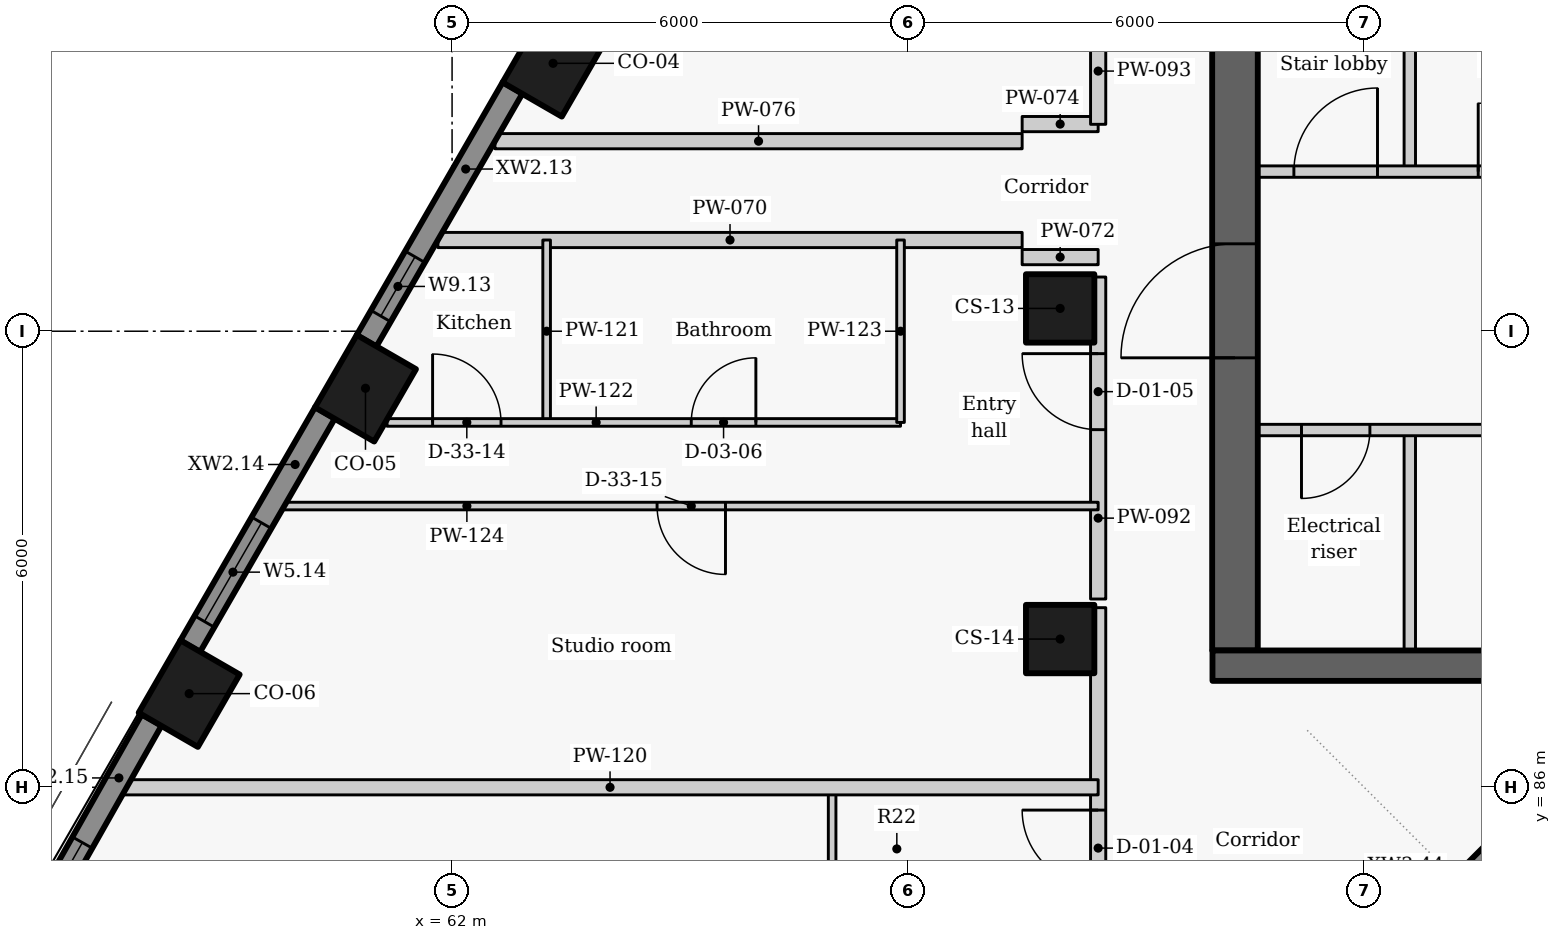
"""IFC4 building model, lengths in metres.
Left out: names, types, materials, properties, quantities, classifications, styles, units other than length and angle.
Written with IfcOpenShell. Run it as: python <this file> out.ifc"""

import sys

from ifc_helpers import new_model, si_unit, direction, frame, frame_2d, origin, origin_2d, place, context, subcontext, project, spatial, rectangle, extrude, element, fill, save


model = new_model("IFC4")
c1 = context("Model", 3, precision=1e-05, world=origin(), true_north=direction((0.0, 1.0)))
c2 = subcontext(c1, "Body", "Model", "MODEL_VIEW")
j1 = project(units=[si_unit("LENGTHUNIT", "METRE"), si_unit("PLANEANGLEUNIT", "RADIAN")], contexts=[c1])
p1 = place(None, origin())
s1 = spatial("IfcSite", under=j1, at=p1, CompositionType="ELEMENT")
p2 = place(p1, origin())
s2 = spatial("IfcBuilding", under=s1, at=p2, CompositionType="ELEMENT")
p3 = place(p2, frame((0.0, 0.0, 249.3)))
s3 = spatial("IfcBuildingStorey", under=s2, at=p3, CompositionType="ELEMENT", Elevation=249.3)
for number, where, z_axis, x_axis in (
    (1, (63.329, 95.525, 0.0), (0.0, 0.0, 1.0), (-0.5, -0.866, 0.0)),
    (2, (60.861, 91.25, 0.0), (0.0, 0.0, 1.0), (-0.5, -0.866, 0.0)),
    (3, (58.541, 87.232, 0.0), (0.0, 0.0, 1.0), (-0.5, -0.866, 0.0)),
):
    element("IfcColumn", number, at=place(p3, frame(where, z_axis=z_axis, x_axis=x_axis)), inside=s3, PredefinedType="COLUMN", context=c2, shape_type="SweptSolid", body=[
        extrude(rectangle(XDim=1.1, YDim=0.9, at=origin_2d()), origin(), (0.0, 0.0, 1.0), 3.3),
    ])
for number, where, z_axis, x_axis in (
    (4, (70.0, 92.3, 0.0), (0.0, 0.0, 1.0), (0.0, -1.0, 0.0)),
    (5, (70.0, 87.95, 0.0), (0.0, 0.0, 1.0), (0.0, -1.0, 0.0)),
):
    element("IfcColumn", number, at=place(p3, frame(where, z_axis=z_axis, x_axis=x_axis)), inside=s3, PredefinedType="COLUMN", context=c2, shape_type="SweptSolid", body=[
        extrude(rectangle(XDim=0.9, YDim=0.9, at=origin_2d()), origin(), (0.0, 0.0, 1.0), 3.3),
    ])
p4 = place(p3, frame((62.796, 95.202, 0.0), z_axis=(0.0, 0.0, 1.0), x_axis=(-0.499984490703, -0.866034357896, 0.0)))
e6 = element("IfcWall", 6, at=p4, inside=s3, PredefinedType="SOLIDWALL", context=c2, shape_type="SweptSolid", body=[
    extrude(rectangle(XDim=3.844, YDim=0.3, at=frame_2d((1.922, 0.0))), origin(), (0.0, 0.0, 1.0), 2.425),
])
p5 = place(p4, frame((2.567, 0.0, 0.9)))
e7 = element("IfcOpeningElement", 7, at=p5, cuts=e6, PredefinedType="OPENING", context=c2, shape_type="SweptSolid", body=[
    extrude(rectangle(XDim=0.9, YDim=1.1, at=frame_2d((0.45, 0.55))), frame((0.0, 0.16, 0.0), z_axis=(0.0, -1.0, 0.0), x_axis=(1.0, 0.0, 0.0)), (0.0, 0.0, 1.0), 0.32),
])
p6 = place(p3, frame((60.328, 90.927, 0.0), z_axis=(0.0, 0.0, 1.0), x_axis=(-0.500010404316, -0.866019396766, 0.0)))
e8 = element("IfcWall", 8, at=p6, inside=s3, PredefinedType="SOLIDWALL", context=c2, shape_type="SweptSolid", body=[
    extrude(rectangle(XDim=3.547, YDim=0.3, at=frame_2d((1.774, 0.0))), origin(), (0.0, 0.0, 1.0), 2.425),
])
p7 = place(p6, frame((1.671, 0.0, 0.9)))
e9 = element("IfcOpeningElement", 9, at=p7, cuts=e8, PredefinedType="OPENING", context=c2, shape_type="SweptSolid", body=[
    extrude(rectangle(XDim=1.5, YDim=1.1, at=frame_2d((0.75, 0.55))), frame((0.0, 0.16, 0.0), z_axis=(0.0, -1.0, 0.0), x_axis=(1.0, 0.0, 0.0)), (0.0, 0.0, 1.0), 0.32),
])
p8 = place(p3, frame((58.048, 86.886, 0.0), z_axis=(0.0, 0.0, 1.0), x_axis=(-0.492080931903, -0.870549456641, 0.0)))
e10 = element("IfcWall", 10, at=p8, inside=s3, PredefinedType="SOLIDWALL", context=c2, shape_type="SweptSolid", body=[
    extrude(rectangle(XDim=5.437, YDim=0.3, at=frame_2d((2.718, 0.0))), origin(), (0.0, 0.0, 1.0), 2.425),
])
p9 = place(p8, frame((1.854, 0.0, 0.9)))
e11 = element("IfcOpeningElement", 11, at=p9, cuts=e10, PredefinedType="OPENING", context=c2, shape_type="SweptSolid", body=[
    extrude(rectangle(XDim=2.1, YDim=1.1, at=frame_2d((1.05, 0.55))), frame((0.0, 0.16, 0.0), z_axis=(0.0, -1.0, 0.0), x_axis=(1.0, 0.0, 0.0)), (0.0, 0.0, 1.0), 0.32),
])
p10 = place(p3, frame((74.194, 83.661, 0.0), z_axis=(0.0, 0.0, 1.0), x_axis=(0.707106781187, 0.707106781187, 0.0)))
e12 = element("IfcWall", 12, at=p10, inside=s3, PredefinedType="SOLIDWALL", context=c2, shape_type="SweptSolid", body=[
    extrude(rectangle(XDim=3.033, YDim=0.25, at=frame_2d((1.517, 0.0))), origin(), (0.0, 0.0, 1.0), 2.425),
])
p11 = place(p3, frame((74.6, 87.8, 0.0), z_axis=(0.0, 0.0, 1.0), x_axis=(0.0, 1.0, 0.0)))
e13 = element("IfcWall", 13, at=p11, inside=s3, PredefinedType="PARTITIONING", context=c2, shape_type="SweptSolid", body=[
    extrude(rectangle(XDim=2.9, YDim=0.15, at=frame_2d((1.45, 0.0))), origin(), (0.0, 0.0, 1.0), 3.025),
])
p12 = place(p3, frame((74.6, 94.1, 0.0), z_axis=(0.0, 0.0, 1.0), x_axis=(0.0, 1.0, 0.0)))
e14 = element("IfcWall", 14, at=p12, inside=s3, PredefinedType="PARTITIONING", context=c2, shape_type="SweptSolid", body=[
    extrude(rectangle(XDim=2.8, YDim=0.15, at=frame_2d((1.4, 0.0))), origin(), (0.0, 0.0, 1.0), 3.025),
])
p13 = place(p3, frame((85.4, 90.7, 0.0), z_axis=(0.0, 0.0, 1.0), x_axis=(-1.0, 0.0, 0.0)))
e15 = element("IfcWall", 15, at=p13, inside=s3, PredefinedType="PARTITIONING", context=c2, shape_type="SweptSolid", body=[
    extrude(rectangle(XDim=13.4, YDim=0.15, at=frame_2d((6.7, 0.0))), origin(), (0.0, 0.0, 1.0), 3.025),
])
p14 = place(p13, frame((11.325, 0.0, 0.0)))
e16 = element("IfcOpeningElement", 16, at=p14, cuts=e15, PredefinedType="OPENING", context=c2, shape_type="SweptSolid", body=[
    extrude(rectangle(XDim=0.9, YDim=2.1, at=frame_2d((0.45, 1.05))), frame((0.0, 0.085, 0.0), z_axis=(0.0, -1.0, 0.0), x_axis=(1.0, 0.0, 0.0)), (0.0, 0.0, 1.0), 0.17),
])
p15 = place(p13, frame((7.65, 0.0, 0.0)))
e17 = element("IfcOpeningElement", 17, at=p15, cuts=e15, PredefinedType="OPENING", context=c2, shape_type="SweptSolid", body=[
    extrude(rectangle(XDim=0.9, YDim=2.1, at=frame_2d((0.45, 1.05))), frame((0.0, 0.085, 0.0), z_axis=(0.0, -1.0, 0.0), x_axis=(1.0, 0.0, 0.0)), (0.0, 0.0, 1.0), 0.17),
])
p16 = place(p13, frame((3.6, 0.0, 0.0)))
e18 = element("IfcOpeningElement", 18, at=p16, cuts=e15, PredefinedType="OPENING", context=c2, shape_type="SweptSolid", body=[
    extrude(rectangle(XDim=0.9, YDim=2.1, at=frame_2d((0.45, 1.05))), frame((0.0, 0.085, 0.0), z_axis=(0.0, -1.0, 0.0), x_axis=(1.0, 0.0, 0.0)), (0.0, 0.0, 1.0), 0.17),
])
p17 = place(p13, frame((0.9, 0.0, 0.0)))
e19 = element("IfcOpeningElement", 19, at=p17, cuts=e15, PredefinedType="OPENING", context=c2, shape_type="SweptSolid", body=[
    extrude(rectangle(XDim=0.9, YDim=2.1, at=frame_2d((0.45, 1.05))), frame((0.0, 0.085, 0.0), z_axis=(0.0, -1.0, 0.0), x_axis=(1.0, 0.0, 0.0)), (0.0, 0.0, 1.0), 0.17),
])
p18 = place(p3, frame((72.3, 87.8, -0.275), z_axis=(0.0, 0.0, 1.0), x_axis=(0.0, 1.0, 0.0)))
e20 = element("IfcWall", 20, at=p18, inside=s3, PredefinedType="SHEAR", context=c2, shape_type="SweptSolid", body=[
    extrude(rectangle(XDim=9.1, YDim=0.6, at=frame_2d((4.55, 0.0))), origin(), (0.0, 0.0, 1.0), 3.3),
])
p19 = place(p18, frame((3.85, 0.0, 0.275)))
e21 = element("IfcOpeningElement", 21, at=p19, cuts=e20, PredefinedType="OPENING", context=c2, shape_type="SweptSolid", body=[
    extrude(rectangle(XDim=1.5, YDim=2.1, at=frame_2d((0.75, 1.05))), frame((0.0, 0.31, 0.0), z_axis=(0.0, -1.0, 0.0), x_axis=(1.0, 0.0, 0.0)), (0.0, 0.0, 1.0), 0.62),
])
p20 = place(p3, frame((72.0, 94.1, 0.0), z_axis=(0.0, 0.0, 1.0), x_axis=(1.0, 0.0, 0.0)))
e22 = element("IfcWall", 22, at=p20, inside=s3, PredefinedType="PARTITIONING", context=c2, shape_type="SweptSolid", body=[
    extrude(rectangle(XDim=10.703, YDim=0.15, at=frame_2d((5.352, 0.0))), origin(), (0.0, 0.0, 1.0), 3.025),
])
p21 = place(p20, frame((1.075, 0.0, 0.0)))
e23 = element("IfcOpeningElement", 23, at=p21, cuts=e22, PredefinedType="OPENING", context=c2, shape_type="SweptSolid", body=[
    extrude(rectangle(XDim=1.1, YDim=2.1, at=frame_2d((0.55, 1.05))), frame((0.0, 0.085, 0.0), z_axis=(0.0, -1.0, 0.0), x_axis=(1.0, 0.0, 0.0)), (0.0, 0.0, 1.0), 0.17),
])
p22 = place(p20, frame((3.5, 0.0, 0.0)))
e24 = element("IfcOpeningElement", 24, at=p22, cuts=e22, PredefinedType="OPENING", context=c2, shape_type="SweptSolid", body=[
    extrude(rectangle(XDim=0.9, YDim=2.1, at=frame_2d((0.45, 1.05))), frame((0.0, 0.085, 0.0), z_axis=(0.0, -1.0, 0.0), x_axis=(1.0, 0.0, 0.0)), (0.0, 0.0, 1.0), 0.17),
])
p23 = place(p20, frame((6.05, 0.0, 0.0)))
e25 = element("IfcOpeningElement", 25, at=p23, cuts=e22, PredefinedType="OPENING", context=c2, shape_type="SweptSolid", body=[
    extrude(rectangle(XDim=1.2, YDim=2.1, at=frame_2d((0.6, 1.05))), frame((0.0, 0.085, 0.0), z_axis=(0.0, -1.0, 0.0), x_axis=(1.0, 0.0, 0.0)), (0.0, 0.0, 1.0), 0.17),
])
p24 = place(p20, frame((8.9, 0.0, 0.0)))
e26 = element("IfcOpeningElement", 26, at=p24, cuts=e22, PredefinedType="OPENING", context=c2, shape_type="SweptSolid", body=[
    extrude(rectangle(XDim=0.9, YDim=2.1, at=frame_2d((0.45, 1.05))), frame((0.0, 0.085, 0.0), z_axis=(0.0, -1.0, 0.0), x_axis=(1.0, 0.0, 0.0)), (0.0, 0.0, 1.0), 0.17),
])
p25 = place(p3, frame((61.813, 93.2, 0.0), z_axis=(0.0, 0.0, 1.0), x_axis=(1.0, 0.0, 0.0)))
e27 = element("IfcWall", 27, at=p25, inside=s3, PredefinedType="PARTITIONING", context=c2, shape_type="SweptSolid", body=[
    extrude(rectangle(XDim=7.687, YDim=0.2, at=frame_2d((3.843, 0.0))), origin(), (0.0, 0.0, 1.0), 2.405),
])
for number, where, z_axis, x_axis in (
    (28, (69.5, 92.975, 0.0), (0.0, 0.0, 1.0), (1.0, 0.0, 0.0)),
    (29, (69.5, 94.725, 0.0), (0.0, 0.0, 1.0), (1.0, 0.0, 0.0)),
):
    element("IfcWall", number, at=place(p3, frame(where, z_axis=z_axis, x_axis=x_axis)), inside=s3, PredefinedType="PARTITIONING", context=c2, shape_type="SweptSolid", body=[
        extrude(rectangle(XDim=1.0, YDim=0.2, at=frame_2d((0.5, 0.0))), origin(), (0.0, 0.0, 1.0), 2.505),
    ])
p26 = place(p3, frame((62.564, 94.5, 0.0), z_axis=(0.0, 0.0, 1.0), x_axis=(1.0, 0.0, 0.0)))
e30 = element("IfcWall", 30, at=p26, inside=s3, PredefinedType="PARTITIONING", context=c2, shape_type="SweptSolid", body=[
    extrude(rectangle(XDim=6.936, YDim=0.2, at=frame_2d((3.468, 0.0))), origin(), (0.0, 0.0, 1.0), 2.405),
])
p27 = place(p3, frame((70.5, 72.577, 0.0), z_axis=(0.0, 0.0, 1.0), x_axis=(0.0, 1.0, 0.0)))
e31 = element("IfcWall", 31, at=p27, inside=s3, PredefinedType="PARTITIONING", context=c2, shape_type="SweptSolid", body=[
    extrude(rectangle(XDim=15.786, YDim=0.2, at=frame_2d((7.893, 0.0))), origin(), (0.0, 0.0, 1.0), 3.025),
])
p28 = place(p27, frame((1.723, 0.0, 0.0)))
e32 = element("IfcOpeningElement", 32, at=p28, cuts=e31, PredefinedType="OPENING", context=c2, shape_type="SweptSolid", body=[
    extrude(rectangle(XDim=1.0, YDim=2.1, at=frame_2d((0.5, 1.05))), frame((0.0, 0.11, 0.0), z_axis=(0.0, -1.0, 0.0), x_axis=(1.0, 0.0, 0.0)), (0.0, 0.0, 1.0), 0.22),
])
p29 = place(p27, frame((12.123, 0.0, 0.0)))
e33 = element("IfcOpeningElement", 33, at=p29, cuts=e31, PredefinedType="OPENING", context=c2, shape_type="SweptSolid", body=[
    extrude(rectangle(XDim=1.0, YDim=2.1, at=frame_2d((0.5, 1.05))), frame((0.0, 0.11, 0.0), z_axis=(0.0, -1.0, 0.0), x_axis=(1.0, 0.0, 0.0)), (0.0, 0.0, 1.0), 0.22),
])
p30 = place(p3, frame((70.5, 88.477, 0.0), z_axis=(0.0, 0.0, 1.0), x_axis=(0.0, 1.0, 0.0)))
e34 = element("IfcWall", 34, at=p30, inside=s3, PredefinedType="PARTITIONING", context=c2, shape_type="SweptSolid", body=[
    extrude(rectangle(XDim=4.236, YDim=0.2, at=frame_2d((2.118, 0.0))), origin(), (0.0, 0.0, 1.0), 3.025),
])
p31 = place(p30, frame((2.228, 0.0, 0.0)))
e35 = element("IfcOpeningElement", 35, at=p31, cuts=e34, PredefinedType="OPENING", context=c2, shape_type="SweptSolid", body=[
    extrude(rectangle(XDim=1.0, YDim=2.1, at=frame_2d((0.5, 1.05))), frame((0.0, 0.11, 0.0), z_axis=(0.0, -1.0, 0.0), x_axis=(1.0, 0.0, 0.0)), (0.0, 0.0, 1.0), 0.22),
])
p32 = place(p3, frame((70.5, 94.722, 0.0), z_axis=(0.0, 0.0, 1.0), x_axis=(0.0, 1.0, 0.0)))
e36 = element("IfcWall", 36, at=p32, inside=s3, PredefinedType="PARTITIONING", context=c2, shape_type="SweptSolid", body=[
    extrude(rectangle(XDim=1.401, YDim=0.2, at=frame_2d((0.701, 0.0))), origin(), (0.0, 0.0, 1.0), 3.025),
])
p33 = place(p3, frame((67.0, 74.0, 0.0), z_axis=(0.0, 0.0, 1.0), x_axis=(0.0, 1.0, 0.0)))
e37 = element("IfcWall", 37, at=p33, inside=s3, PredefinedType="PARTITIONING", context=c2, shape_type="SweptSolid", body=[
    extrude(rectangle(XDim=12.0, YDim=0.1, at=frame_2d((6.0, 0.0))), origin(), (0.0, 0.0, 1.0), 3.025),
])
p34 = place(p33, frame((2.55, 0.0, 0.0)))
e38 = element("IfcOpeningElement", 38, at=p34, cuts=e37, PredefinedType="OPENING", context=c2, shape_type="SweptSolid", body=[
    extrude(rectangle(XDim=0.9, YDim=2.1, at=frame_2d((0.45, 1.05))), frame((0.0, 0.06, 0.0), z_axis=(0.0, -1.0, 0.0), x_axis=(1.0, 0.0, 0.0)), (0.0, 0.0, 1.0), 0.12),
])
p35 = place(p33, frame((8.55, 0.0, 0.0)))
e39 = element("IfcOpeningElement", 39, at=p35, cuts=e37, PredefinedType="OPENING", context=c2, shape_type="SweptSolid", body=[
    extrude(rectangle(XDim=0.9, YDim=2.1, at=frame_2d((0.45, 1.05))), frame((0.0, 0.06, 0.0), z_axis=(0.0, -1.0, 0.0), x_axis=(1.0, 0.0, 0.0)), (0.0, 0.0, 1.0), 0.12),
])
p36 = place(p3, frame((57.656, 86.0, 0.0), z_axis=(0.0, 0.0, 1.0), x_axis=(1.0, 0.0, 0.0)))
e40 = element("IfcWall", 40, at=p36, inside=s3, PredefinedType="PARTITIONING", context=c2, shape_type="SweptSolid", body=[
    extrude(rectangle(XDim=12.844, YDim=0.2, at=frame_2d((6.422, 0.0))), origin(), (0.0, 0.0, 1.0), 2.405),
])
p37 = place(p3, frame((63.244, 90.8, 0.0), z_axis=(0.0, 0.0, 1.0), x_axis=(0.0, 1.0, 0.0)))
e41 = element("IfcWall", 41, at=p37, inside=s3, PredefinedType="PARTITIONING", context=c2, shape_type="SweptSolid", body=[
    extrude(rectangle(XDim=2.4, YDim=0.1, at=frame_2d((1.2, 0.0))), origin(), (0.0, 0.0, 1.0), 3.025),
])
p38 = place(p3, frame((61.144, 90.8, 0.0), z_axis=(0.0, 0.0, 1.0), x_axis=(1.0, 0.0, 0.0)))
e42 = element("IfcWall", 42, at=p38, inside=s3, PredefinedType="PARTITIONING", context=c2, shape_type="SweptSolid", body=[
    extrude(rectangle(XDim=6.756, YDim=0.1, at=frame_2d((3.378, 0.0))), origin(), (0.0, 0.0, 1.0), 3.025),
])
p39 = place(p38, frame((0.6, 0.0, 0.0)))
e43 = element("IfcOpeningElement", 43, at=p39, cuts=e42, PredefinedType="OPENING", context=c2, shape_type="SweptSolid", body=[
    extrude(rectangle(XDim=0.9, YDim=2.1, at=frame_2d((0.45, 1.05))), frame((0.0, 0.06, 0.0), z_axis=(0.0, -1.0, 0.0), x_axis=(1.0, 0.0, 0.0)), (0.0, 0.0, 1.0), 0.12),
])
p40 = place(p38, frame((4.003, 0.0, 0.0)))
e44 = element("IfcOpeningElement", 44, at=p40, cuts=e42, PredefinedType="OPENING", context=c2, shape_type="SweptSolid", body=[
    extrude(rectangle(XDim=0.85, YDim=2.1, at=frame_2d((0.425, 1.05))), frame((0.0, 0.06, 0.0), z_axis=(0.0, -1.0, 0.0), x_axis=(1.0, 0.0, 0.0)), (0.0, 0.0, 1.0), 0.12),
])
p41 = place(p3, frame((67.9, 90.8, 0.0), z_axis=(0.0, 0.0, 1.0), x_axis=(0.0, 1.0, 0.0)))
e45 = element("IfcWall", 45, at=p41, inside=s3, PredefinedType="PARTITIONING", context=c2, shape_type="SweptSolid", body=[
    extrude(rectangle(XDim=2.4, YDim=0.1, at=frame_2d((1.2, 0.0))), origin(), (0.0, 0.0, 1.0), 3.025),
])
p42 = place(p3, frame((70.5, 89.7, 0.0), z_axis=(0.0, 0.0, 1.0), x_axis=(-1.0, 0.0, 0.0)))
e46 = element("IfcWall", 46, at=p42, inside=s3, PredefinedType="PARTITIONING", context=c2, shape_type="SweptSolid", body=[
    extrude(rectangle(XDim=10.707, YDim=0.1, at=frame_2d((5.354, 0.0))), origin(), (0.0, 0.0, 1.0), 2.405),
])
p43 = place(p42, frame((4.903, 0.0, 0.0)))
e47 = element("IfcOpeningElement", 47, at=p43, cuts=e46, PredefinedType="OPENING", context=c2, shape_type="SweptSolid", body=[
    extrude(rectangle(XDim=0.9, YDim=2.1, at=frame_2d((0.45, 1.05))), frame((0.0, 0.06, 0.0), z_axis=(0.0, -1.0, 0.0), x_axis=(1.0, 0.0, 0.0)), (0.0, 0.0, 1.0), 0.12),
])
p44 = place(p3, frame((72.004, 87.6, -0.275), z_axis=(0.0, 0.0, 1.0), x_axis=(1.0, 0.0, 0.0)))
e48 = element("IfcWall", 48, at=p44, inside=s3, PredefinedType="SHEAR", context=c2, shape_type="SweptSolid", body=[
    extrude(rectangle(XDim=15.992, YDim=0.4, at=frame_2d((7.996, 0.0))), origin(), (0.0, 0.0, 1.0), 3.3),
])
p45 = place(p5, origin())
e49 = element("IfcWindow", 49, at=p45, inside=s3, PartitioningType="SINGLE_PANEL", PredefinedType="WINDOW", context=c2, shape_type="SweptSolid", body=[
    extrude(rectangle(XDim=0.9, YDim=1.1, at=frame_2d((0.45, 0.55))), frame((0.0, 0.03, 0.0), z_axis=(0.0, -1.0, 0.0), x_axis=(1.0, 0.0, 0.0)), (0.0, 0.0, 1.0), 0.06),
])
fill(e7, e49)
p46 = place(p7, origin())
e50 = element("IfcWindow", 50, at=p46, inside=s3, PartitioningType="SINGLE_PANEL", PredefinedType="WINDOW", context=c2, shape_type="SweptSolid", body=[
    extrude(rectangle(XDim=1.5, YDim=1.1, at=frame_2d((0.75, 0.55))), frame((0.0, 0.03, 0.0), z_axis=(0.0, -1.0, 0.0), x_axis=(1.0, 0.0, 0.0)), (0.0, 0.0, 1.0), 0.06),
])
fill(e9, e50)
p47 = place(p9, origin())
e51 = element("IfcWindow", 51, at=p47, inside=s3, PartitioningType="SINGLE_PANEL", PredefinedType="WINDOW", context=c2, shape_type="SweptSolid", body=[
    extrude(rectangle(XDim=2.1, YDim=1.1, at=frame_2d((1.05, 0.55))), frame((0.0, 0.03, 0.0), z_axis=(0.0, -1.0, 0.0), x_axis=(1.0, 0.0, 0.0)), (0.0, 0.0, 1.0), 0.06),
])
fill(e11, e51)
p48 = place(p14, origin())
e52 = element("IfcDoor", 52, at=p48, inside=s3, OperationType="SINGLE_SWING_RIGHT", PredefinedType="DOOR", context=c2, shape_type="SweptSolid", body=[
    extrude(rectangle(XDim=0.9, YDim=2.1, at=frame_2d((0.45, 1.05))), frame((0.0, 0.025, 0.0), z_axis=(0.0, -1.0, 0.0), x_axis=(1.0, 0.0, 0.0)), (0.0, 0.0, 1.0), 0.05),
])
fill(e16, e52)
p49 = place(p21, origin())
e53 = element("IfcDoor", 53, at=p49, inside=s3, OperationType="SINGLE_SWING_RIGHT", PredefinedType="DOOR", context=c2, shape_type="SweptSolid", body=[
    extrude(rectangle(XDim=1.1, YDim=2.1, at=frame_2d((0.55, 1.05))), frame((0.0, 0.025, 0.0), z_axis=(0.0, -1.0, 0.0), x_axis=(1.0, 0.0, 0.0)), (0.0, 0.0, 1.0), 0.05),
])
fill(e23, e53)
p50 = place(p22, origin())
e54 = element("IfcDoor", 54, at=p50, inside=s3, OperationType="SINGLE_SWING_LEFT", PredefinedType="DOOR", context=c2, shape_type="SweptSolid", body=[
    extrude(rectangle(XDim=0.9, YDim=2.1, at=frame_2d((0.45, 1.05))), frame((0.0, 0.025, 0.0), z_axis=(0.0, -1.0, 0.0), x_axis=(1.0, 0.0, 0.0)), (0.0, 0.0, 1.0), 0.05),
])
fill(e24, e54)
p51 = place(p29, origin())
e55 = element("IfcDoor", 55, at=p51, inside=s3, OperationType="SINGLE_SWING_RIGHT", PredefinedType="DOOR", context=c2, shape_type="SweptSolid", body=[
    extrude(rectangle(XDim=1.0, YDim=2.1, at=frame_2d((0.5, 1.05))), frame((0.0, 0.025, 0.0), z_axis=(0.0, -1.0, 0.0), x_axis=(1.0, 0.0, 0.0)), (0.0, 0.0, 1.0), 0.05),
])
fill(e33, e55)
p52 = place(p31, origin())
e56 = element("IfcDoor", 56, at=p52, inside=s3, OperationType="SINGLE_SWING_RIGHT", PredefinedType="DOOR", context=c2, shape_type="SweptSolid", body=[
    extrude(rectangle(XDim=1.0, YDim=2.1, at=frame_2d((0.5, 1.05))), frame((0.0, 0.025, 0.0), z_axis=(0.0, -1.0, 0.0), x_axis=(1.0, 0.0, 0.0)), (0.0, 0.0, 1.0), 0.05),
])
fill(e35, e56)
p53 = place(p39, origin())
e57 = element("IfcDoor", 57, at=p53, inside=s3, OperationType="SINGLE_SWING_LEFT", PredefinedType="DOOR", context=c2, shape_type="SweptSolid", body=[
    extrude(rectangle(XDim=0.9, YDim=2.1, at=frame_2d((0.45, 1.05))), frame((0.0, 0.025, 0.0), z_axis=(0.0, -1.0, 0.0), x_axis=(1.0, 0.0, 0.0)), (0.0, 0.0, 1.0), 0.05),
])
fill(e43, e57)
p54 = place(p40, origin())
e58 = element("IfcDoor", 58, at=p54, inside=s3, OperationType="SINGLE_SWING_RIGHT", PredefinedType="DOOR", context=c2, shape_type="SweptSolid", body=[
    extrude(rectangle(XDim=0.85, YDim=2.1, at=frame_2d((0.425, 1.05))), frame((0.0, 0.025, 0.0), z_axis=(0.0, -1.0, 0.0), x_axis=(1.0, 0.0, 0.0)), (0.0, 0.0, 1.0), 0.05),
])
fill(e44, e58)
p55 = place(p43, origin())
e59 = element("IfcDoor", 59, at=p55, inside=s3, OperationType="SINGLE_SWING_LEFT", PredefinedType="DOOR", context=c2, shape_type="SweptSolid", body=[
    extrude(rectangle(XDim=0.9, YDim=2.1, at=frame_2d((0.45, 1.05))), frame((0.0, 0.025, 0.0), z_axis=(0.0, -1.0, 0.0), x_axis=(1.0, 0.0, 0.0)), (0.0, 0.0, 1.0), 0.05),
])
fill(e47, e59)
p56 = place(p19, origin())
e60 = element("IfcDoor", 60, at=p56, inside=s3, OperationType="DOUBLE_DOOR_SINGLE_SWING", PredefinedType="DOOR", context=c2, shape_type="SweptSolid", body=[
    extrude(rectangle(XDim=1.5, YDim=2.1, at=frame_2d((0.75, 1.05))), frame((0.0, 0.025, 0.0), z_axis=(0.0, -1.0, 0.0), x_axis=(1.0, 0.0, 0.0)), (0.0, 0.0, 1.0), 0.05),
])
fill(e21, e60)
save(model, sys.argv[1])
